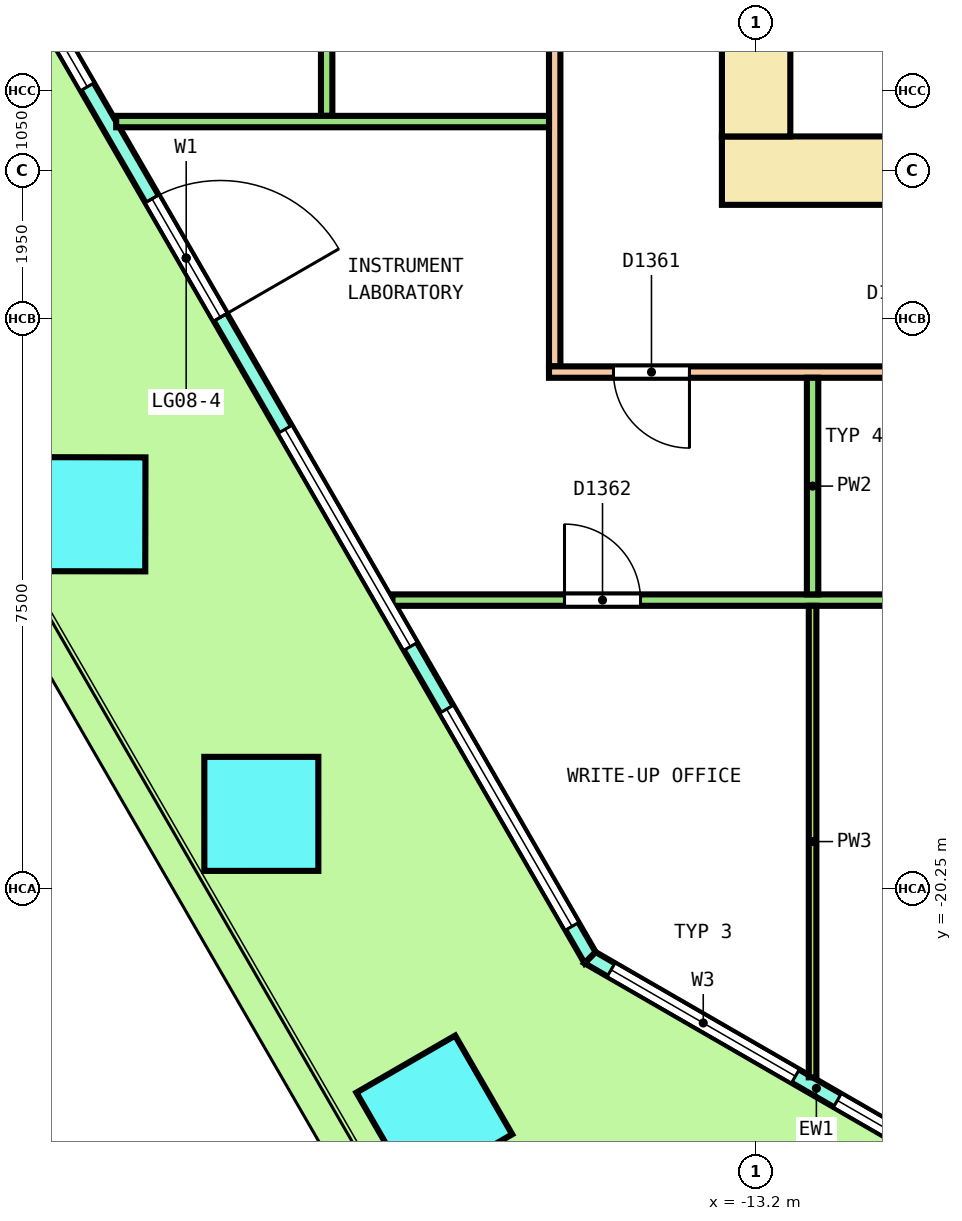
"""IFC4 building model, lengths in metres.
Left out: names, types, materials, properties, quantities, classifications, styles, units other than length and angle.
Written with IfcOpenShell. Run it as: python <this file> out.ifc"""

import sys

from ifc_helpers import new_model, si_unit, direction, frame, frame_2d, origin, origin_2d, place, context, subcontext, project, spatial, polyline, rectangle, outline, extrude, element, fill, save


model = new_model("IFC4")
c1 = context("Model", 3, precision=1e-05, world=origin(), true_north=direction((0.0, 1.0)))
c2 = subcontext(c1, "Body", "Model", "MODEL_VIEW")
j1 = project(units=[si_unit("LENGTHUNIT", "METRE"), si_unit("PLANEANGLEUNIT", "RADIAN")], contexts=[c1])
p1 = place(None, origin())
s1 = spatial("IfcSite", under=j1, at=p1, CompositionType="ELEMENT")
p2 = place(p1, origin())
s2 = spatial("IfcBuilding", under=s1, at=p2, CompositionType="ELEMENT")
p3 = place(p2, frame((0.0, 0.0, 36.6)))
s3 = spatial("IfcBuildingStorey", under=s2, at=p3, CompositionType="ELEMENT", Elevation=36.6)
p4 = place(p3, frame((-21.985, -15.321, 0.0), z_axis=(0.003616977835, -0.006269428248, 0.999973805527), x_axis=(0.498177151135, -0.867045061108, -0.007237962107)))
e1 = element("IfcColumn", 1, at=p4, inside=s3, PredefinedType="COLUMN", context=c2, shape_type="SweptSolid", body=[
    extrude(rectangle(XDim=1.5, YDim=1.5, at=origin_2d()), origin(), (0.0, 0.0, 1.0), 4.05),
])
p5 = place(p3, frame((-19.709, -19.262, 0.0), z_axis=(0.010908911174, -0.018864581201, 0.999762533421), x_axis=(0.500638363085, -0.865382200335, -0.021791667014)))
e2 = element("IfcColumn", 2, at=p5, inside=s3, PredefinedType="COLUMN", context=c2, shape_type="SweptSolid", body=[
    extrude(rectangle(XDim=1.5, YDim=1.5, at=origin_2d()), origin(), (0.0, 0.0, 1.0), 4.051),
])
p6 = place(p3, frame((-17.434, -23.204, 0.0), z_axis=(0.018133721723, -0.031387604711, 0.999342777233), x_axis=(0.86588493646, -0.499257214888, -0.031392836679)))
e3 = element("IfcColumn", 3, at=p6, inside=s3, PredefinedType="COLUMN", context=c2, shape_type="SweptSolid", body=[
    extrude(rectangle(XDim=1.5, YDim=1.5, at=origin_2d()), origin(), (0.0, 0.0, 1.0), 4.052),
])
p7 = place(p3, frame((-26.012, -2.746, 0.0), z_axis=(0.0, 0.0, 1.0), x_axis=(0.499998188434, -0.86602644969, 0.0)))
e4 = element("IfcWall", 4, at=p7, inside=s3, PredefinedType="SOLIDWALL", context=c2, shape_type="SweptSolid", body=[
    extrude(outline(polyline([(-0.027, -0.1), (0.988, -0.1), (2.003, -0.1), (3.017, -0.1), (4.032, -0.1), (5.047, -0.1), (6.062, -0.1), (7.076, -0.1), (8.091, -0.1), (9.106, -0.1), (10.121, -0.1), (11.135, -0.1), (12.15, -0.1), (13.165, -0.1), (14.179, -0.1), (15.194, -0.1), (16.209, -0.1), (17.224, -0.1), (18.239, -0.1), (19.253, -0.1), (20.268, -0.1), (21.283, -0.1), (21.229, 0.1), (20.219, 0.1), (19.21, 0.1), (18.2, 0.1), (17.19, 0.1), (16.181, 0.1), (15.171, 0.1), (14.162, 0.1), (13.152, 0.1), (12.142, 0.1), (11.133, 0.1), (10.123, 0.1), (9.114, 0.1), (8.104, 0.1), (7.094, 0.1), (6.085, 0.1), (5.075, 0.1), (4.065, 0.1), (3.056, 0.1), (2.046, 0.1), (1.036, 0.1), (0.027, 0.1), (-0.027, -0.1)])), origin(), (0.0, 0.0, 1.0), 4.1),
])
p8 = place(p7, frame((0.476, 0.0, 0.1)))
e5 = element("IfcOpeningElement", 5, at=p8, cuts=e4, PredefinedType="OPENING", context=c2, shape_type="SweptSolid", body=[
    extrude(rectangle(XDim=3.3, YDim=2.9, at=frame_2d((1.65, 1.45))), frame((0.0, 0.11, 0.0), z_axis=(0.0, -1.0, 0.0), x_axis=(1.0, 0.0, 0.0)), (0.0, 0.0, 1.0), 0.22),
])
p9 = place(p7, frame((4.727, 0.0, 0.1)))
e6 = element("IfcOpeningElement", 6, at=p9, cuts=e4, PredefinedType="OPENING", context=c2, shape_type="SweptSolid", body=[
    extrude(rectangle(XDim=3.3, YDim=2.9, at=frame_2d((1.65, 1.45))), frame((0.0, 0.11, 0.0), z_axis=(0.0, -1.0, 0.0), x_axis=(1.0, 0.0, 0.0)), (0.0, 0.0, 1.0), 0.22),
])
p10 = place(p7, frame((9.728, 0.0, 0.0)))
e7 = element("IfcOpeningElement", 7, at=p10, cuts=e4, PredefinedType="OPENING", context=c2, shape_type="SweptSolid", body=[
    extrude(rectangle(XDim=1.8, YDim=2.4, at=frame_2d((0.9, 1.2))), frame((0.0, 0.11, 0.0), z_axis=(0.0, -1.0, 0.0), x_axis=(1.0, 0.0, 0.0)), (0.0, 0.0, 1.0), 0.22),
])
p11 = place(p7, frame((9.728, 0.0, 2.55)))
e8 = element("IfcOpeningElement", 8, at=p11, cuts=e4, PredefinedType="OPENING", context=c2, shape_type="SweptSolid", body=[
    extrude(rectangle(XDim=1.8, YDim=0.45, at=frame_2d((0.9, 0.225))), frame((0.0, 0.11, 0.0), z_axis=(0.0, -1.0, 0.0), x_axis=(1.0, 0.0, 0.0)), (0.0, 0.0, 1.0), 0.22),
])
p12 = place(p7, frame((13.229, 0.0, 0.1)))
e9 = element("IfcOpeningElement", 9, at=p12, cuts=e4, PredefinedType="OPENING", context=c2, shape_type="SweptSolid", body=[
    extrude(rectangle(XDim=3.3, YDim=2.9, at=frame_2d((1.65, 1.45))), frame((0.0, 0.11, 0.0), z_axis=(0.0, -1.0, 0.0), x_axis=(1.0, 0.0, 0.0)), (0.0, 0.0, 1.0), 0.22),
])
p13 = place(p7, frame((17.48, 0.0, 0.1)))
e10 = element("IfcOpeningElement", 10, at=p13, cuts=e4, PredefinedType="OPENING", context=c2, shape_type="SweptSolid", body=[
    extrude(rectangle(XDim=3.3, YDim=2.9, at=frame_2d((1.65, 1.45))), frame((0.0, 0.11, 0.0), z_axis=(0.0, -1.0, 0.0), x_axis=(1.0, 0.0, 0.0)), (0.0, 0.0, 1.0), 0.22),
])
p14 = place(p3, frame((-15.384, -21.154, 0.0), z_axis=(0.0, 0.0, 1.0), x_axis=(0.866029458321, -0.49999297727, 0.0)))
e11 = element("IfcWall", 11, at=p14, inside=s3, PredefinedType="SOLIDWALL", context=c2, shape_type="SweptSolid", body=[
    extrude(outline(polyline([(-0.027, -0.1), (1.128, -0.1), (2.282, -0.1), (3.437, -0.1), (4.592, -0.1), (5.747, -0.1), (6.901, -0.1), (6.848, 0.1), (5.711, 0.1), (4.574, 0.1), (3.437, 0.1), (2.301, 0.1), (1.164, 0.1), (0.027, 0.1), (-0.027, -0.1)])), origin(), (0.0, 0.0, 1.0), 4.1),
])
p15 = place(p14, frame((0.319, 0.0, 0.1)))
e12 = element("IfcOpeningElement", 12, at=p15, cuts=e11, PredefinedType="OPENING", context=c2, shape_type="SweptSolid", body=[
    extrude(rectangle(XDim=2.8, YDim=2.9, at=frame_2d((1.4, 1.45))), frame((0.0, 0.11, 0.0), z_axis=(0.0, -1.0, 0.0), x_axis=(1.0, 0.0, 0.0)), (0.0, 0.0, 1.0), 0.22),
])
p16 = place(p14, frame((3.756, 0.0, 0.1)))
e13 = element("IfcOpeningElement", 13, at=p16, cuts=e11, PredefinedType="OPENING", context=c2, shape_type="SweptSolid", body=[
    extrude(rectangle(XDim=2.8, YDim=2.9, at=frame_2d((1.4, 1.45))), frame((0.0, 0.11, 0.0), z_axis=(0.0, -1.0, 0.0), x_axis=(1.0, 0.0, 0.0)), (0.0, 0.0, 1.0), 0.22),
])
p17 = place(p3, frame((-13.65, -10.8, 0.0), z_axis=(0.0, 0.0, 1.0), x_axis=(1.0, 0.0, 0.0)))
e14 = element("IfcWall", 14, at=p17, inside=s3, PredefinedType="SHEAR", context=c2, shape_type="SweptSolid", body=[
    extrude(rectangle(XDim=27.3, YDim=0.9, at=frame_2d((13.65, 0.0))), origin(), (0.0, 0.0, 1.0), 4.1),
])
p18 = place(p17, frame((3.453, 0.0, 0.0)))
e15 = element("IfcOpeningElement", 15, at=p18, cuts=e14, PredefinedType="OPENING", context=c2, shape_type="SweptSolid", body=[
    extrude(rectangle(XDim=1.0, YDim=2.1, at=frame_2d((0.5, 1.05))), frame((0.0, 0.46, 0.0), z_axis=(0.0, -1.0, 0.0), x_axis=(1.0, 0.0, 0.0)), (0.0, 0.0, 1.0), 0.92),
])
p19 = place(p17, frame((9.653, 0.0, 0.0)))
e16 = element("IfcOpeningElement", 16, at=p19, cuts=e14, PredefinedType="OPENING", context=c2, shape_type="SweptSolid", body=[
    extrude(rectangle(XDim=1.0, YDim=2.1, at=frame_2d((0.5, 1.05))), frame((0.0, 0.46, 0.0), z_axis=(0.0, -1.0, 0.0), x_axis=(1.0, 0.0, 0.0)), (0.0, 0.0, 1.0), 0.92),
])
p20 = place(p17, frame((19.872, 0.0, 0.0)))
e17 = element("IfcOpeningElement", 17, at=p20, cuts=e14, PredefinedType="OPENING", context=c2, shape_type="SweptSolid", body=[
    extrude(rectangle(XDim=1.0, YDim=2.1, at=frame_2d((0.5, 1.05))), frame((0.0, 0.46, 0.0), z_axis=(0.0, -1.0, 0.0), x_axis=(1.0, 0.0, 0.0)), (0.0, 0.0, 1.0), 0.92),
])
p21 = place(p17, frame((23.922, 0.0, 0.0)))
e18 = element("IfcOpeningElement", 18, at=p21, cuts=e14, PredefinedType="OPENING", context=c2, shape_type="SweptSolid", body=[
    extrude(rectangle(XDim=1.0, YDim=2.1, at=frame_2d((0.5, 1.05))), frame((0.0, 0.46, 0.0), z_axis=(0.0, -1.0, 0.0), x_axis=(1.0, 0.0, 0.0)), (0.0, 0.0, 1.0), 0.92),
])
p22 = place(p17, frame((15.2, 0.0, 0.0)))
e19 = element("IfcOpeningElement", 19, at=p22, cuts=e14, PredefinedType="OPENING", context=c2, shape_type="SweptSolid", body=[
    extrude(rectangle(XDim=1.2, YDim=2.1, at=frame_2d((0.6, 1.05))), frame((0.0, 0.46, 0.0), z_axis=(0.0, -1.0, 0.0), x_axis=(1.0, 0.0, 0.0)), (0.0, 0.0, 1.0), 0.92),
])
p23 = place(p3, frame((-13.2, -10.35, 0.0), z_axis=(0.0, 0.0, 1.0), x_axis=(0.0, 1.0, 0.0)))
e20 = element("IfcWall", 20, at=p23, inside=s3, PredefinedType="SHEAR", context=c2, shape_type="SweptSolid", body=[
    extrude(rectangle(XDim=20.7, YDim=0.9, at=frame_2d((10.35, 0.0))), origin(), (0.0, 0.0, 1.0), 4.1),
])
p24 = place(p23, frame((9.15, 0.0, 0.0)))
e21 = element("IfcOpeningElement", 21, at=p24, cuts=e20, PredefinedType="OPENING", context=c2, shape_type="SweptSolid", body=[
    extrude(rectangle(XDim=2.4, YDim=2.1, at=frame_2d((1.2, 1.05))), frame((0.0, 0.46, 0.0), z_axis=(0.0, -1.0, 0.0), x_axis=(1.0, 0.0, 0.0)), (0.0, 0.0, 1.0), 0.92),
])
p25 = place(p23, frame((16.05, 0.0, 0.0)))
e22 = element("IfcOpeningElement", 22, at=p25, cuts=e20, PredefinedType="OPENING", context=c2, shape_type="SweptSolid", body=[
    extrude(rectangle(XDim=1.2, YDim=2.1, at=frame_2d((0.6, 1.05))), frame((0.0, 0.46, 0.0), z_axis=(0.0, -1.0, 0.0), x_axis=(1.0, 0.0, 0.0)), (0.0, 0.0, 1.0), 0.92),
])
p26 = place(p23, frame((3.45, 0.0, 0.0)))
e23 = element("IfcOpeningElement", 23, at=p26, cuts=e20, PredefinedType="OPENING", context=c2, shape_type="SweptSolid", body=[
    extrude(rectangle(XDim=1.2, YDim=2.1, at=frame_2d((0.6, 1.05))), frame((0.0, 0.46, 0.0), z_axis=(0.0, -1.0, 0.0), x_axis=(1.0, 0.0, 0.0)), (0.0, 0.0, 1.0), 0.92),
])
p27 = place(p3, frame((-15.85, -13.375, 0.0), z_axis=(0.0, 0.0, 1.0), x_axis=(0.0, 1.0, 0.0)))
e24 = element("IfcWall", 24, at=p27, inside=s3, PredefinedType="PARTITIONING", context=c2, shape_type="SweptSolid", body=[
    extrude(rectangle(XDim=26.775, YDim=0.15, at=frame_2d((13.387, 0.0))), origin(), (0.0, 0.0, 1.0), 3.05),
])
p28 = place(p27, frame((24.693, 0.0, 0.0)))
e25 = element("IfcOpeningElement", 25, at=p28, cuts=e24, PredefinedType="OPENING", context=c2, shape_type="SweptSolid", body=[
    extrude(rectangle(XDim=1.0, YDim=2.1, at=frame_2d((0.5, 1.05))), frame((0.0, 0.085, 0.0), z_axis=(0.0, -1.0, 0.0), x_axis=(1.0, 0.0, 0.0)), (0.0, 0.0, 1.0), 0.17),
])
p29 = place(p27, frame((16.495, 0.0, 0.0)))
e26 = element("IfcOpeningElement", 26, at=p29, cuts=e24, PredefinedType="OPENING", context=c2, shape_type="SweptSolid", body=[
    extrude(rectangle(XDim=1.0, YDim=2.1, at=frame_2d((0.5, 1.05))), frame((0.0, 0.085, 0.0), z_axis=(0.0, -1.0, 0.0), x_axis=(1.0, 0.0, 0.0)), (0.0, 0.0, 1.0), 0.17),
])
p30 = place(p27, frame((6.771, 0.0, 0.0)))
e27 = element("IfcOpeningElement", 27, at=p30, cuts=e24, PredefinedType="OPENING", context=c2, shape_type="SweptSolid", body=[
    extrude(rectangle(XDim=1.0, YDim=2.1, at=frame_2d((0.5, 1.05))), frame((0.0, 0.085, 0.0), z_axis=(0.0, -1.0, 0.0), x_axis=(1.0, 0.0, 0.0)), (0.0, 0.0, 1.0), 0.17),
])
p31 = place(p3, frame((-15.925, -13.45, 0.0), z_axis=(0.0, 0.0, 1.0), x_axis=(1.0, 0.0, 0.0)))
e28 = element("IfcWall", 28, at=p31, inside=s3, PredefinedType="PARTITIONING", context=c2, shape_type="SweptSolid", body=[
    extrude(rectangle(XDim=31.85, YDim=0.15, at=frame_2d((15.925, 0.0))), origin(), (0.0, 0.0, 1.0), 3.05),
])
p32 = place(p31, frame((0.848, 0.0, 0.0)))
e29 = element("IfcOpeningElement", 29, at=p32, cuts=e28, PredefinedType="OPENING", context=c2, shape_type="SweptSolid", body=[
    extrude(rectangle(XDim=1.0, YDim=2.1, at=frame_2d((0.5, 1.05))), frame((0.0, 0.085, 0.0), z_axis=(0.0, -1.0, 0.0), x_axis=(1.0, 0.0, 0.0)), (0.0, 0.0, 1.0), 0.17),
])
p33 = place(p31, frame((5.088, 0.0, 0.0)))
e30 = element("IfcOpeningElement", 30, at=p33, cuts=e28, PredefinedType="OPENING", context=c2, shape_type="SweptSolid", body=[
    extrude(rectangle(XDim=1.0, YDim=2.1, at=frame_2d((0.5, 1.05))), frame((0.0, 0.085, 0.0), z_axis=(0.0, -1.0, 0.0), x_axis=(1.0, 0.0, 0.0)), (0.0, 0.0, 1.0), 0.17),
])
p34 = place(p31, frame((13.013, 0.0, 0.0)))
e31 = element("IfcOpeningElement", 31, at=p34, cuts=e28, PredefinedType="OPENING", context=c2, shape_type="SweptSolid", body=[
    extrude(rectangle(XDim=1.0, YDim=2.1, at=frame_2d((0.5, 1.05))), frame((0.0, 0.085, 0.0), z_axis=(0.0, -1.0, 0.0), x_axis=(1.0, 0.0, 0.0)), (0.0, 0.0, 1.0), 0.17),
])
p35 = place(p31, frame((24.778, 0.0, 0.0)))
e32 = element("IfcOpeningElement", 32, at=p35, cuts=e28, PredefinedType="OPENING", context=c2, shape_type="SweptSolid", body=[
    extrude(rectangle(XDim=1.0, YDim=2.1, at=frame_2d((0.5, 1.05))), frame((0.0, 0.085, 0.0), z_axis=(0.0, -1.0, 0.0), x_axis=(1.0, 0.0, 0.0)), (0.0, 0.0, 1.0), 0.17),
])
p36 = place(p3, frame((-18.85, -10.08, 0.0), z_axis=(0.0, 0.0, 1.0), x_axis=(0.0, 1.0, 0.0)))
e33 = element("IfcWall", 33, at=p36, inside=s3, PredefinedType="PARTITIONING", context=c2, shape_type="SweptSolid", body=[
    extrude(rectangle(XDim=20.737, YDim=0.15, at=frame_2d((10.369, 0.0))), origin(), (0.0, 0.0, 1.0), 3.05),
])
p37 = place(p36, frame((17.208, 0.0, 0.0)))
e34 = element("IfcOpeningElement", 34, at=p37, cuts=e33, PredefinedType="OPENING", context=c2, shape_type="SweptSolid", body=[
    extrude(rectangle(XDim=1.2, YDim=2.1, at=frame_2d((0.6, 1.05))), frame((0.0, 0.085, 0.0), z_axis=(0.0, -1.0, 0.0), x_axis=(1.0, 0.0, 0.0)), (0.0, 0.0, 1.0), 0.17),
])
p38 = place(p3, frame((-21.619, -10.155, 0.0), z_axis=(0.0, 0.0, 1.0), x_axis=(1.0, 0.0, 0.0)))
e35 = element("IfcWall", 35, at=p38, inside=s3, PredefinedType="PARTITIONING", context=c2, shape_type="SweptSolid", body=[
    extrude(rectangle(XDim=5.694, YDim=0.15, at=frame_2d((2.847, 0.0))), origin(), (0.0, 0.0, 1.0), 3.05),
])
p39 = place(p3, frame((-17.985, -16.45, 0.0), z_axis=(0.0, 0.0, 1.0), x_axis=(1.0, 0.0, 0.0)))
e36 = element("IfcWall", 36, at=p39, inside=s3, PredefinedType="PARTITIONING", context=c2, shape_type="SweptSolid", body=[
    extrude(rectangle(XDim=23.584, YDim=0.15, at=frame_2d((11.792, 0.0))), origin(), (0.0, 0.0, 1.0), 3.05),
])
p40 = place(p39, frame((2.264, 0.0, 0.0)))
e37 = element("IfcOpeningElement", 37, at=p40, cuts=e36, PredefinedType="OPENING", context=c2, shape_type="SweptSolid", body=[
    extrude(rectangle(XDim=1.0, YDim=2.1, at=frame_2d((0.5, 1.05))), frame((0.0, 0.085, 0.0), z_axis=(0.0, -1.0, 0.0), x_axis=(1.0, 0.0, 0.0)), (0.0, 0.0, 1.0), 0.17),
])
p41 = place(p39, frame((9.539, 0.0, 0.0)))
e38 = element("IfcOpeningElement", 38, at=p41, cuts=e36, PredefinedType="OPENING", context=c2, shape_type="SweptSolid", body=[
    extrude(rectangle(XDim=1.2, YDim=2.1, at=frame_2d((0.6, 1.05))), frame((0.0, 0.085, 0.0), z_axis=(0.0, -1.0, 0.0), x_axis=(1.0, 0.0, 0.0)), (0.0, 0.0, 1.0), 0.17),
])
p42 = place(p39, frame((19.747, 0.0, 0.0)))
e39 = element("IfcOpeningElement", 39, at=p42, cuts=e36, PredefinedType="OPENING", context=c2, shape_type="SweptSolid", body=[
    extrude(rectangle(XDim=1.2, YDim=2.1, at=frame_2d((0.6, 1.05))), frame((0.0, 0.085, 0.0), z_axis=(0.0, -1.0, 0.0), x_axis=(1.0, 0.0, 0.0)), (0.0, 0.0, 1.0), 0.17),
])
p43 = place(p3, frame((-12.457, -16.375, 0.0), z_axis=(0.0, 0.0, 1.0), x_axis=(0.0, 1.0, 0.0)))
e40 = element("IfcWall", 40, at=p43, inside=s3, PredefinedType="PARTITIONING", context=c2, shape_type="SweptSolid", body=[
    extrude(rectangle(XDim=2.85, YDim=0.15, at=frame_2d((1.425, 0.0))), origin(), (0.0, 0.0, 1.0), 3.05),
])
p44 = place(p3, frame((-12.457, -22.729, 0.0), z_axis=(0.0, 0.0, 1.0), x_axis=(0.0, 1.0, 0.0)))
e41 = element("IfcWall", 41, at=p44, inside=s3, PredefinedType="PARTITIONING", context=c2, shape_type="SweptSolid", body=[
    extrude(rectangle(XDim=6.204, YDim=0.1, at=frame_2d((3.102, 0.0))), origin(), (0.0, 0.0, 1.0), 3.05),
])
p45 = place(p9, origin())
e42 = element("IfcWindow", 42, at=p45, inside=s3, PartitioningType="SINGLE_PANEL", PredefinedType="WINDOW", context=c2, shape_type="SweptSolid", body=[
    extrude(rectangle(XDim=3.3, YDim=2.9, at=frame_2d((1.65, 1.45))), frame((0.0, 0.03, 0.0), z_axis=(0.0, -1.0, 0.0), x_axis=(1.0, 0.0, 0.0)), (0.0, 0.0, 1.0), 0.06),
])
fill(e6, e42)
p46 = place(p10, origin())
e43 = element("IfcDoor", 43, at=p46, inside=s3, OperationType="DOUBLE_DOOR_SINGLE_SWING", PredefinedType="DOOR", context=c2, shape_type="SweptSolid", body=[
    extrude(rectangle(XDim=1.8, YDim=2.4, at=frame_2d((0.9, 1.2))), frame((0.0, 0.025, 0.0), z_axis=(0.0, -1.0, 0.0), x_axis=(1.0, 0.0, 0.0)), (0.0, 0.0, 1.0), 0.05),
])
fill(e7, e43)
p47 = place(p11, origin())
e44 = element("IfcWindow", 44, at=p47, inside=s3, PartitioningType="SINGLE_PANEL", PredefinedType="WINDOW", context=c2, shape_type="SweptSolid", body=[
    extrude(rectangle(XDim=1.8, YDim=0.45, at=frame_2d((0.9, 0.225))), frame((0.0, 0.03, 0.0), z_axis=(0.0, -1.0, 0.0), x_axis=(1.0, 0.0, 0.0)), (0.0, 0.0, 1.0), 0.06),
])
fill(e8, e44)
p48 = place(p12, origin())
e45 = element("IfcWindow", 45, at=p48, inside=s3, PartitioningType="SINGLE_PANEL", PredefinedType="WINDOW", context=c2, shape_type="SweptSolid", body=[
    extrude(rectangle(XDim=3.3, YDim=2.9, at=frame_2d((1.65, 1.45))), frame((0.0, 0.03, 0.0), z_axis=(0.0, -1.0, 0.0), x_axis=(1.0, 0.0, 0.0)), (0.0, 0.0, 1.0), 0.06),
])
fill(e9, e45)
p49 = place(p13, origin())
e46 = element("IfcWindow", 46, at=p49, inside=s3, PartitioningType="SINGLE_PANEL", PredefinedType="WINDOW", context=c2, shape_type="SweptSolid", body=[
    extrude(rectangle(XDim=3.3, YDim=2.9, at=frame_2d((1.65, 1.45))), frame((0.0, 0.03, 0.0), z_axis=(0.0, -1.0, 0.0), x_axis=(1.0, 0.0, 0.0)), (0.0, 0.0, 1.0), 0.06),
])
fill(e10, e46)
p50 = place(p15, origin())
e47 = element("IfcWindow", 47, at=p50, inside=s3, PartitioningType="SINGLE_PANEL", PredefinedType="WINDOW", context=c2, shape_type="SweptSolid", body=[
    extrude(rectangle(XDim=2.8, YDim=2.9, at=frame_2d((1.4, 1.45))), frame((0.0, 0.03, 0.0), z_axis=(0.0, -1.0, 0.0), x_axis=(1.0, 0.0, 0.0)), (0.0, 0.0, 1.0), 0.06),
])
fill(e12, e47)
p51 = place(p16, origin())
e48 = element("IfcWindow", 48, at=p51, inside=s3, PartitioningType="SINGLE_PANEL", PredefinedType="WINDOW", context=c2, shape_type="SweptSolid", body=[
    extrude(rectangle(XDim=2.8, YDim=2.9, at=frame_2d((1.4, 1.45))), frame((0.0, 0.03, 0.0), z_axis=(0.0, -1.0, 0.0), x_axis=(1.0, 0.0, 0.0)), (0.0, 0.0, 1.0), 0.06),
])
fill(e13, e48)
p52 = place(p32, origin())
e49 = element("IfcDoor", 49, at=p52, inside=s3, OperationType="SINGLE_SWING_RIGHT", PredefinedType="DOOR", context=c2, shape_type="SweptSolid", body=[
    extrude(rectangle(XDim=1.0, YDim=2.1, at=frame_2d((0.5, 1.05))), frame((0.0, 0.025, 0.0), z_axis=(0.0, -1.0, 0.0), x_axis=(1.0, 0.0, 0.0)), (0.0, 0.0, 1.0), 0.05),
])
fill(e29, e49)
p53 = place(p40, origin())
e50 = element("IfcDoor", 50, at=p53, inside=s3, OperationType="SINGLE_SWING_LEFT", PredefinedType="DOOR", context=c2, shape_type="SweptSolid", body=[
    extrude(rectangle(XDim=1.0, YDim=2.1, at=frame_2d((0.5, 1.05))), frame((0.0, 0.025, 0.0), z_axis=(0.0, -1.0, 0.0), x_axis=(1.0, 0.0, 0.0)), (0.0, 0.0, 1.0), 0.05),
])
fill(e37, e50)
save(model, sys.argv[1])
